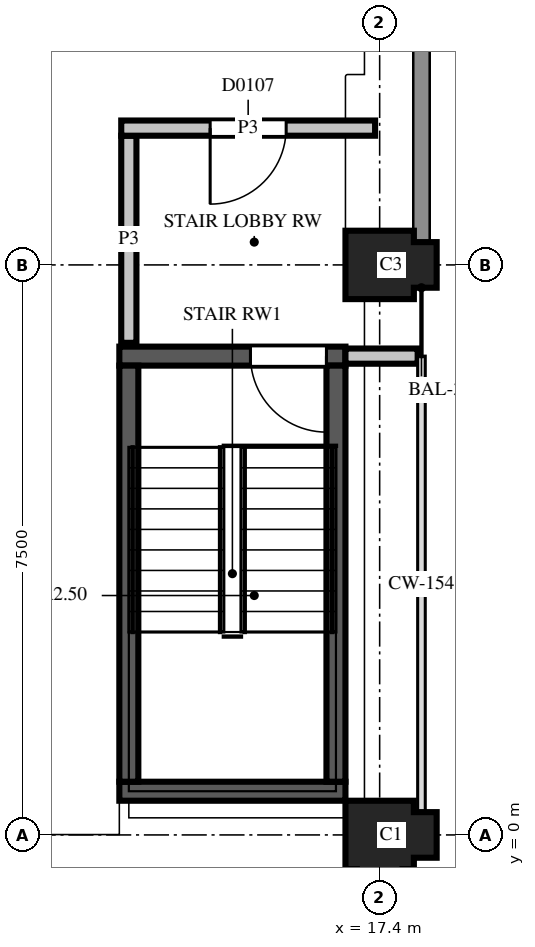
"""IFC4 building model, lengths in metres.
Left out: names, types, materials, properties, quantities, classifications, styles, units other than length and angle.
Written with IfcOpenShell. Run it as: python <this file> out.ifc"""

import sys

from ifc_helpers import new_model, si_unit, direction, frame, frame_2d, origin, place, context, subcontext, project, spatial, polyline, rectangle, outline, extrude, element, fill, save


model = new_model("IFC4")
c1 = context("Model", 3, precision=1e-05, world=origin(), true_north=direction((0.0, 1.0)))
c2 = subcontext(c1, "Body", "Model", "MODEL_VIEW")
j1 = project(units=[si_unit("LENGTHUNIT", "METRE"), si_unit("PLANEANGLEUNIT", "RADIAN")], contexts=[c1])
p1 = place(None, origin())
s1 = spatial("IfcSite", under=j1, at=p1, CompositionType="ELEMENT")
p2 = place(p1, origin())
s2 = spatial("IfcBuilding", under=s1, at=p2, CompositionType="ELEMENT")
p3 = place(p2, frame((0.0, 0.0, 4.5)))
s3 = spatial("IfcBuildingStorey", under=s2, at=p3, CompositionType="ELEMENT", Elevation=4.5)
p4 = place(p3, frame((17.4, 0.0, 0.0), z_axis=(0.0, 0.0, 1.0), x_axis=(0.0, -1.0, 0.0)))
e1 = element("IfcColumn", 1, at=p4, inside=s3, PredefinedType="COLUMN", context=c2, shape_type="SweptSolid", body=[
    extrude(outline(polyline([(-0.45, -0.45), (0.45, -0.45), (0.45, -0.3), (0.75, -0.3), (0.75, 0.3), (0.45, 0.3), (0.45, 0.45), (0.3, 0.45), (0.3, 0.75), (-0.3, 0.75), (-0.3, 0.45), (-0.45, 0.45), (-0.45, -0.45)])), origin(), (0.0, 0.0, 1.0), 3.7),
])
p5 = place(p3, frame((17.4, 7.5, 0.0), z_axis=(0.0, 0.0, 1.0), x_axis=(1.0, 0.0, 0.0)))
e2 = element("IfcColumn", 2, at=p5, inside=s3, PredefinedType="COLUMN", context=c2, shape_type="SweptSolid", body=[
    extrude(outline(polyline([(-0.45, -0.45), (0.45, -0.45), (0.45, -0.3), (0.75, -0.3), (0.75, 0.3), (0.45, 0.3), (0.45, 0.45), (-0.45, 0.45), (-0.45, -0.45)])), origin(), (0.0, 0.0, 1.0), 3.7),
])
p6 = place(p3, frame((13.975, 0.575, 0.0), z_axis=(0.0, 0.0, 1.0), x_axis=(1.0, 0.0, 0.0)))
e3 = element("IfcWall", 3, at=p6, inside=s3, PredefinedType="SHEAR", context=c2, shape_type="SweptSolid", body=[
    extrude(rectangle(XDim=2.975, YDim=0.25, at=frame_2d((1.487, 0.0))), origin(), (0.0, 0.0, 1.0), 3.7),
])
p7 = place(p3, frame((13.975, 6.3, 0.0), z_axis=(0.0, 0.0, 1.0), x_axis=(1.0, 0.0, 0.0)))
e4 = element("IfcWall", 4, at=p7, inside=s3, PredefinedType="SHEAR", context=c2, shape_type="SweptSolid", body=[
    extrude(rectangle(XDim=2.975, YDim=0.25, at=frame_2d((1.487, 0.0))), origin(), (0.0, 0.0, 1.0), 3.7),
])
p8 = place(p7, frame((1.725, 0.0, 0.0)))
e5 = element("IfcOpeningElement", 5, at=p8, cuts=e4, PredefinedType="OPENING", context=c2, shape_type="SweptSolid", body=[
    extrude(rectangle(XDim=1.0, YDim=2.1, at=frame_2d((0.5, 1.05))), frame((0.0, 0.135, 0.0), z_axis=(0.0, -1.0, 0.0), x_axis=(1.0, 0.0, 0.0)), (0.0, 0.0, 1.0), 0.27),
])
for number, where, z_axis, x_axis in (
    (6, (14.1, 0.7, 0.0), (0.0, 0.0, 1.0), (0.0, 1.0, 0.0)),
    (7, (16.825, 0.7, 0.0), (0.0, 0.0, 1.0), (0.0, 1.0, 0.0)),
):
    element("IfcWall", number, at=place(p3, frame(where, z_axis=z_axis, x_axis=x_axis)), inside=s3, PredefinedType="SHEAR", context=c2, shape_type="SweptSolid", body=[
        extrude(rectangle(XDim=5.475, YDim=0.25, at=frame_2d((2.738, 0.0))), origin(), (0.0, 0.0, 1.0), 3.7),
    ])
p9 = place(p3, frame((16.95, 6.3, 0.0), z_axis=(0.0, 0.0, 1.0), x_axis=(1.0, 0.0, 0.0)))
e8 = element("IfcWall", 8, at=p9, inside=s3, PredefinedType="PARTITIONING", context=c2, shape_type="SweptSolid", body=[
    extrude(rectangle(XDim=0.95, YDim=0.2, at=frame_2d((0.475, 0.0))), origin(), (0.0, 0.0, 1.0), 2.88),
])
p10 = place(p3, frame((14.1, 9.2, 0.0), z_axis=(0.0, 0.0, 1.0), x_axis=(0.0, -1.0, 0.0)))
e9 = element("IfcWall", 9, at=p10, inside=s3, PredefinedType="PARTITIONING", context=c2, shape_type="SweptSolid", body=[
    extrude(rectangle(XDim=2.725, YDim=0.2, at=frame_2d((1.362, 0.0))), origin(), (0.0, 0.0, 1.0), 2.88),
])
p11 = place(p3, frame((17.34, 9.3, 0.0), z_axis=(0.0, 0.0, 1.0), x_axis=(-1.0, 0.0, 0.0)))
e10 = element("IfcWall", 10, at=p11, inside=s3, PredefinedType="PARTITIONING", context=c2, shape_type="SweptSolid", body=[
    extrude(rectangle(XDim=3.34, YDim=0.2, at=frame_2d((1.67, 0.0))), origin(), (0.0, 0.0, 1.0), 2.88),
])
p12 = place(p11, frame((1.17, 0.0, 0.0)))
e11 = element("IfcOpeningElement", 11, at=p12, cuts=e10, PredefinedType="OPENING", context=c2, shape_type="SweptSolid", body=[
    extrude(rectangle(XDim=1.0, YDim=2.1, at=frame_2d((0.5, 1.05))), frame((0.0, 0.11, 0.0), z_axis=(0.0, -1.0, 0.0), x_axis=(1.0, 0.0, 0.0)), (0.0, 0.0, 1.0), 0.22),
])
p13 = place(p12, origin())
e12 = element("IfcDoor", 12, at=p13, inside=s3, OperationType="SINGLE_SWING_LEFT", PredefinedType="DOOR", context=c2, shape_type="SweptSolid", body=[
    extrude(rectangle(XDim=1.0, YDim=2.1, at=frame_2d((0.5, 1.05))), frame((0.0, 0.025, 0.0), z_axis=(0.0, -1.0, 0.0), x_axis=(1.0, 0.0, 0.0)), (0.0, 0.0, 1.0), 0.05),
])
fill(e11, e12)
p14 = place(p8, origin())
e13 = element("IfcDoor", 13, at=p14, inside=s3, OperationType="SINGLE_SWING_RIGHT", PredefinedType="DOOR", context=c2, shape_type="SweptSolid", body=[
    extrude(rectangle(XDim=1.0, YDim=2.1, at=frame_2d((0.5, 1.05))), frame((0.0, 0.025, 0.0), z_axis=(0.0, -1.0, 0.0), x_axis=(1.0, 0.0, 0.0)), (0.0, 0.0, 1.0), 0.05),
])
fill(e5, e13)
save(model, sys.argv[1])
